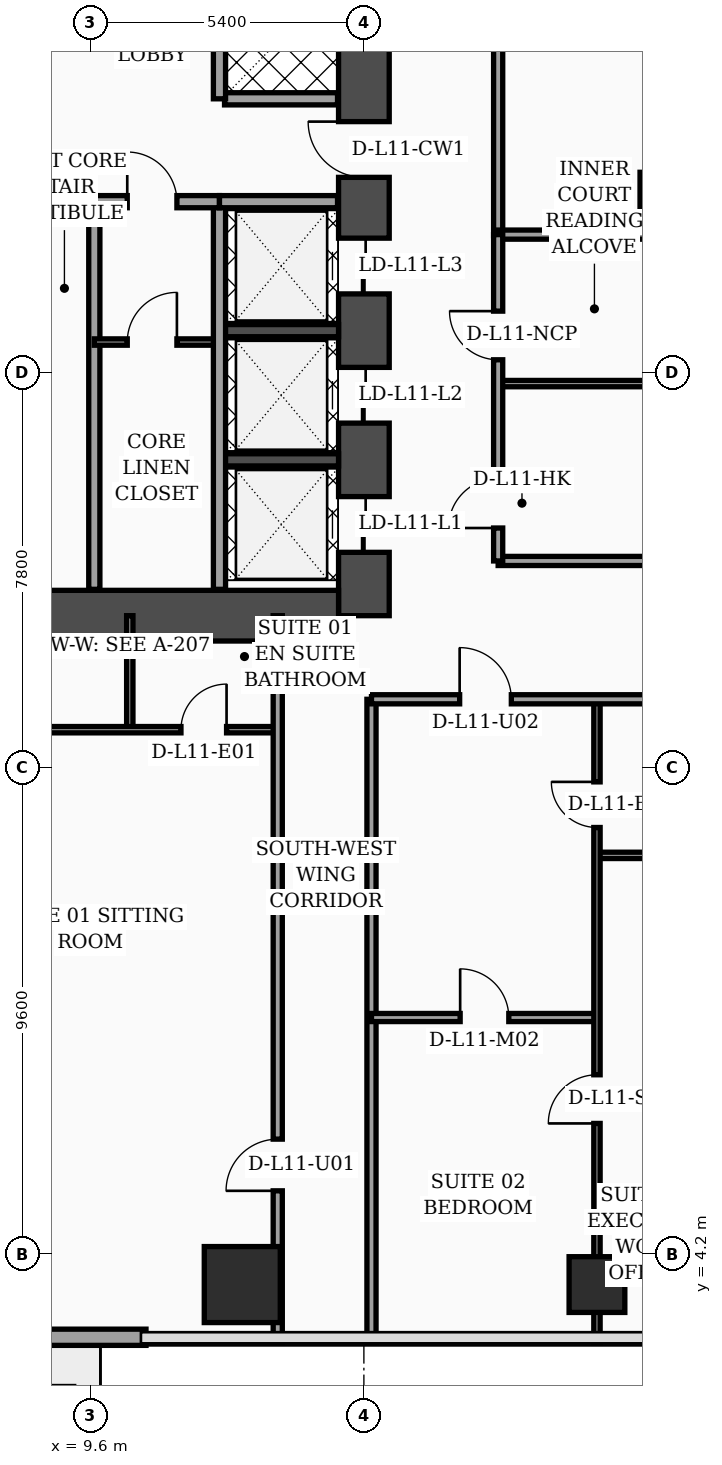
"""IFC4 building model, lengths in metres.
Left out: names, types, materials, properties, quantities, classifications, styles, units other than length and angle.
Written with IfcOpenShell. Run it as: python <this file> out.ifc"""

import sys

from ifc_helpers import new_model, si_unit, direction, frame, frame_2d, origin, origin_2d, place, context, subcontext, project, spatial, rectangle, hollow_rectangle, extrude, element, fill, save


model = new_model("IFC4")
c1 = context("Model", 3, precision=1e-05, world=origin(), true_north=direction((0.0, 1.0)))
c2 = subcontext(c1, "Body", "Model", "MODEL_VIEW")
j1 = project(units=[si_unit("LENGTHUNIT", "METRE"), si_unit("PLANEANGLEUNIT", "RADIAN")], contexts=[c1])
p1 = place(None, origin())
s1 = spatial("IfcSite", under=j1, at=p1, CompositionType="ELEMENT")
p2 = place(p1, origin())
s2 = spatial("IfcBuilding", under=s1, at=p2, CompositionType="ELEMENT")
p3 = place(p2, frame((0.0, 0.0, 50.8)))
s3 = spatial("IfcBuildingStorey", under=s2, at=p3, CompositionType="ELEMENT", Elevation=50.8)
p4 = place(p3, frame((15.0, 16.8, 0.0), z_axis=(0.0, 0.0, 1.0), x_axis=(0.0, 1.0, 0.0)))
e1 = element("IfcWall", 1, at=p4, inside=s3, PredefinedType="SHEAR", context=c2, shape_type="SweptSolid", body=[
    extrude(rectangle(XDim=21.6, YDim=1.0, at=frame_2d((10.8, 0.0))), origin(), (0.0, 0.0, 1.0), 3.56),
])
p5 = place(p4, frame((8.65, 0.0, 0.0)))
e2 = element("IfcOpeningElement", 2, at=p5, cuts=e1, PredefinedType="OPENING", context=c2, shape_type="SweptSolid", body=[
    extrude(rectangle(XDim=1.1, YDim=2.2, at=frame_2d((0.55, 1.1))), frame((0.0, 0.51, 0.0), z_axis=(0.0, -1.0, 0.0), x_axis=(1.0, 0.0, 0.0)), (0.0, 0.0, 1.0), 1.02),
])
p6 = place(p4, frame((1.25, 0.0, 0.0)))
e3 = element("IfcOpeningElement", 3, at=p6, cuts=e1, PredefinedType="OPENING", context=c2, shape_type="SweptSolid", body=[
    extrude(rectangle(XDim=1.1, YDim=2.2, at=frame_2d((0.55, 1.1))), frame((0.0, 0.51, 0.0), z_axis=(0.0, -1.0, 0.0), x_axis=(1.0, 0.0, 0.0)), (0.0, 0.0, 1.0), 1.02),
])
p7 = place(p4, frame((3.8, 0.0, 0.0)))
e4 = element("IfcOpeningElement", 4, at=p7, cuts=e1, PredefinedType="OPENING", context=c2, shape_type="SweptSolid", body=[
    extrude(rectangle(XDim=1.1, YDim=2.2, at=frame_2d((0.55, 1.1))), frame((0.0, 0.51, 0.0), z_axis=(0.0, -1.0, 0.0), x_axis=(1.0, 0.0, 0.0)), (0.0, 0.0, 1.0), 1.02),
])
p8 = place(p4, frame((6.35, 0.0, 0.0)))
e5 = element("IfcOpeningElement", 5, at=p8, cuts=e1, PredefinedType="OPENING", context=c2, shape_type="SweptSolid", body=[
    extrude(rectangle(XDim=1.1, YDim=2.2, at=frame_2d((0.55, 1.1))), frame((0.0, 0.51, 0.0), z_axis=(0.0, -1.0, 0.0), x_axis=(1.0, 0.0, 0.0)), (0.0, 0.0, 1.0), 1.02),
])
p9 = place(p3, frame((4.7, 16.8, 0.0), z_axis=(0.0, 0.0, 1.0), x_axis=(1.0, 0.0, 0.0)))
e6 = element("IfcWall", 6, at=p9, inside=s3, PredefinedType="SHEAR", context=c2, shape_type="SweptSolid", body=[
    extrude(rectangle(XDim=9.8, YDim=1.0, at=frame_2d((4.9, 0.0))), origin(), (0.0, 0.0, 1.0), 3.56),
])
for number, where, z_axis, x_axis in (
    (7, (12.18, 19.875, 0.0), (0.0, 0.0, 1.0), (1.0, 0.0, 0.0)),
    (8, (12.18, 22.425, 0.0), (0.0, 0.0, 1.0), (1.0, 0.0, 0.0)),
):
    element("IfcWall", number, at=place(p3, frame(where, z_axis=z_axis, x_axis=x_axis)), inside=s3, PredefinedType="SOLIDWALL", context=c2, shape_type="SweptSolid", body=[
        extrude(rectangle(XDim=2.32, YDim=0.24, at=frame_2d((1.16, 0.0))), origin(), (0.0, 0.0, 1.0), 3.56),
    ])
p10 = place(p3, frame((12.6, 3.6, 0.0), z_axis=(0.0, 0.0, 1.0), x_axis=(1.0, 0.0, 0.0)))
e9 = element("IfcColumn", 9, at=p10, inside=s3, PredefinedType="COLUMN", context=c2, shape_type="SweptSolid", body=[
    extrude(rectangle(XDim=1.5, YDim=1.5, at=origin_2d()), origin(), (0.0, 0.0, 1.0), 3.56),
])
for number, where, z_axis, x_axis in (
    (10, (21.0, 25.0, 0.0), (0.0, 0.0, 1.0), (1.0, 0.0, 0.0)),
    (11, (19.6, 3.6, 0.0), (0.0, 0.0, 1.0), (1.0, 0.0, 0.0)),
):
    element("IfcColumn", number, at=place(p3, frame(where, z_axis=z_axis, x_axis=x_axis)), inside=s3, PredefinedType="COLUMN", context=c2, shape_type="SweptSolid", body=[
        extrude(hollow_rectangle(XDim=1.1, YDim=1.1, WallThickness=0.045, at=origin_2d()), origin(), (0.0, 0.0, 1.0), 3.56),
    ])
p11 = place(p3, frame((3.1, 2.56, 0.0), z_axis=(0.0, 0.0, 1.0), x_axis=(1.0, 0.0, 0.0)))
e12 = element("IfcWall", 12, at=p11, inside=s3, PredefinedType="SOLIDWALL", context=c2, shape_type="SweptSolid", body=[
    extrude(rectangle(XDim=7.6, YDim=0.32, at=frame_2d((3.8, 0.0))), origin(), (0.0, 0.0, 1.0), 3.56),
])
p12 = place(p11, frame((0.45, 0.0, 0.75)))
e13 = element("IfcOpeningElement", 13, at=p12, cuts=e12, PredefinedType="OPENING", context=c2, shape_type="SweptSolid", body=[
    extrude(rectangle(XDim=1.0, YDim=1.6, at=frame_2d((0.5, 0.8))), frame((0.0, 0.17, 0.0), z_axis=(0.0, -1.0, 0.0), x_axis=(1.0, 0.0, 0.0)), (0.0, 0.0, 1.0), 0.34),
])
p13 = place(p11, frame((3.8, 0.0, 0.0)))
e14 = element("IfcOpeningElement", 14, at=p13, cuts=e12, PredefinedType="OPENING", context=c2, shape_type="SweptSolid", body=[
    extrude(rectangle(XDim=1.4, YDim=2.25, at=frame_2d((0.7, 1.125))), frame((0.0, 0.17, 0.0), z_axis=(0.0, -1.0, 0.0), x_axis=(1.0, 0.0, 0.0)), (0.0, 0.0, 1.0), 0.34),
])
p14 = place(p3, frame((9.68, 17.32, 0.0), z_axis=(0.0, 0.0, 1.0), x_axis=(0.0, 1.0, 0.0)))
e15 = element("IfcWall", 15, at=p14, inside=s3, PredefinedType="SOLIDWALL", context=c2, shape_type="SweptSolid", body=[
    extrude(rectangle(XDim=7.68, YDim=0.22, at=frame_2d((3.84, 0.0))), origin(), (0.0, 0.0, 1.0), 3.56),
])
p15 = place(p3, frame((9.68, 22.2, 0.0), z_axis=(0.0, 0.0, 1.0), x_axis=(1.0, 0.0, 0.0)))
e16 = element("IfcWall", 16, at=p15, inside=s3, PredefinedType="PARTITIONING", context=c2, shape_type="SweptSolid", body=[
    extrude(rectangle(XDim=2.47, YDim=0.125, at=frame_2d((1.235, 0.0))), origin(), (0.0, 0.0, 1.0), 3.56),
])
p16 = place(p15, frame((0.65, 0.0, 0.0)))
e17 = element("IfcOpeningElement", 17, at=p16, cuts=e16, PredefinedType="OPENING", context=c2, shape_type="SweptSolid", body=[
    extrude(rectangle(XDim=0.98, YDim=2.15, at=frame_2d((0.49, 1.075))), frame((0.0, 0.073, 0.0), z_axis=(0.0, -1.0, 0.0), x_axis=(1.0, 0.0, 0.0)), (0.0, 0.0, 1.0), 0.145),
])
p17 = place(p3, frame((12.15, 17.32, 0.0), z_axis=(0.0, 0.0, 1.0), x_axis=(0.0, 1.0, 0.0)))
e18 = element("IfcWall", 18, at=p17, inside=s3, PredefinedType="SOLIDWALL", context=c2, shape_type="SweptSolid", body=[
    extrude(rectangle(XDim=7.65, YDim=0.24, at=frame_2d((3.825, 0.0))), origin(), (0.0, 0.0, 1.0), 3.56),
])
p18 = place(p3, frame((9.68, 24.97, 0.0), z_axis=(0.0, 0.0, 1.0), x_axis=(1.0, 0.0, 0.0)))
e19 = element("IfcWall", 19, at=p18, inside=s3, PredefinedType="SOLIDWALL", context=c2, shape_type="SweptSolid", body=[
    extrude(rectangle(XDim=2.47, YDim=0.24, at=frame_2d((1.235, 0.0))), origin(), (0.0, 0.0, 1.0), 3.56),
])
p19 = place(p18, frame((0.65, 0.0, 0.0)))
e20 = element("IfcOpeningElement", 20, at=p19, cuts=e19, PredefinedType="OPENING", context=c2, shape_type="SweptSolid", body=[
    extrude(rectangle(XDim=0.98, YDim=2.15, at=frame_2d((0.49, 1.075))), frame((0.0, 0.13, 0.0), z_axis=(0.0, -1.0, 0.0), x_axis=(1.0, 0.0, 0.0)), (0.0, 0.0, 1.0), 0.26),
])
p20 = place(p3, frame((12.15, 24.97, 0.0), z_axis=(0.0, 0.0, 1.0), x_axis=(1.0, 0.0, 0.0)))
e21 = element("IfcWall", 21, at=p20, inside=s3, PredefinedType="SOLIDWALL", context=c2, shape_type="SweptSolid", body=[
    extrude(rectangle(XDim=2.33, YDim=0.24, at=frame_2d((1.165, 0.0))), origin(), (0.0, 0.0, 1.0), 2.84),
])
p21 = place(p3, frame((12.25, 27.0, 0.0), z_axis=(0.0, 0.0, 1.0), x_axis=(1.0, 0.0, 0.0)))
e22 = element("IfcWall", 22, at=p21, inside=s3, PredefinedType="SOLIDWALL", context=c2, shape_type="SweptSolid", body=[
    extrude(rectangle(XDim=2.23, YDim=0.24, at=frame_2d((1.115, 0.0))), origin(), (0.0, 0.0, 1.0), 3.56),
])
p22 = place(p3, frame((12.15, 27.0, 0.0), z_axis=(0.0, 0.0, 1.0), x_axis=(0.0, 1.0, 0.0)))
e23 = element("IfcWall", 23, at=p22, inside=s3, PredefinedType="SOLIDWALL", context=c2, shape_type="SweptSolid", body=[
    extrude(rectangle(XDim=7.75, YDim=0.24, at=frame_2d((3.875, 0.0))), origin(), (0.0, 0.0, 1.0), 3.56),
])
p23 = place(p3, frame((10.38, 14.55, 0.0), z_axis=(0.0, 0.0, 1.0), x_axis=(0.0, 1.0, 0.0)))
e24 = element("IfcWall", 24, at=p23, inside=s3, PredefinedType="PARTITIONING", context=c2, shape_type="SweptSolid", body=[
    extrude(rectangle(XDim=2.25, YDim=0.125, at=frame_2d((1.125, 0.0))), origin(), (0.0, 0.0, 1.0), 3.56),
])
p24 = place(p3, frame((3.2, 14.55, 0.0), z_axis=(0.0, 0.0, 1.0), x_axis=(1.0, 0.0, 0.0)))
e25 = element("IfcWall", 25, at=p24, inside=s3, PredefinedType="PARTITIONING", context=c2, shape_type="SweptSolid", body=[
    extrude(rectangle(XDim=10.1, YDim=0.125, at=frame_2d((5.05, 0.0))), origin(), (0.0, 0.0, 1.0), 2.84),
])
p25 = place(p24, frame((3.29, 0.0, 0.0)))
e26 = element("IfcOpeningElement", 26, at=p25, cuts=e25, PredefinedType="OPENING", context=c2, shape_type="SweptSolid", body=[
    extrude(rectangle(XDim=0.96, YDim=2.2, at=frame_2d((0.48, 1.1))), frame((0.0, 0.073, 0.0), z_axis=(0.0, -1.0, 0.0), x_axis=(1.0, 0.0, 0.0)), (0.0, 0.0, 1.0), 0.145),
])
p26 = place(p24, frame((8.19, 0.0, 0.0)))
e27 = element("IfcOpeningElement", 27, at=p26, cuts=e25, PredefinedType="OPENING", context=c2, shape_type="SweptSolid", body=[
    extrude(rectangle(XDim=0.9, YDim=2.15, at=frame_2d((0.45, 1.075))), frame((0.0, 0.073, 0.0), z_axis=(0.0, -1.0, 0.0), x_axis=(1.0, 0.0, 0.0)), (0.0, 0.0, 1.0), 0.145),
])
p27 = place(p3, frame((13.3, 2.44, 0.0), z_axis=(0.0, 0.0, 1.0), x_axis=(0.0, 1.0, 0.0)))
e28 = element("IfcWall", 28, at=p27, inside=s3, PredefinedType="PARTITIONING", context=c2, shape_type="SweptSolid", body=[
    extrude(rectangle(XDim=14.36, YDim=0.18, at=frame_2d((7.18, 0.0))), origin(), (0.0, 0.0, 1.0), 3.04),
])
p28 = place(p27, frame((3.01, 0.0, 0.0)))
e29 = element("IfcOpeningElement", 29, at=p28, cuts=e28, PredefinedType="OPENING", context=c2, shape_type="SweptSolid", body=[
    extrude(rectangle(XDim=1.02, YDim=2.2, at=frame_2d((0.51, 1.1))), frame((0.0, 0.1, 0.0), z_axis=(0.0, -1.0, 0.0), x_axis=(1.0, 0.0, 0.0)), (0.0, 0.0, 1.0), 0.2),
])
p29 = place(p3, frame((15.15, 2.44, 0.0), z_axis=(0.0, 0.0, 1.0), x_axis=(0.0, 1.0, 0.0)))
e30 = element("IfcWall", 30, at=p29, inside=s3, PredefinedType="PARTITIONING", context=c2, shape_type="SweptSolid", body=[
    extrude(rectangle(XDim=12.71, YDim=0.18, at=frame_2d((6.355, 0.0))), origin(), (0.0, 0.0, 1.0), 3.04),
])
p30 = place(p3, frame((19.6, 12.07, 0.0), z_axis=(0.0, 0.0, 1.0), x_axis=(1.0, 0.0, 0.0)))
e31 = element("IfcWall", 31, at=p30, inside=s3, PredefinedType="PARTITIONING", context=c2, shape_type="SweptSolid", body=[
    extrude(rectangle(XDim=2.0, YDim=0.125, at=frame_2d((1.0, 0.0))), origin(), (0.0, 0.0, 1.0), 3.56),
])
p31 = place(p3, frame((15.15, 8.87, 0.0), z_axis=(0.0, 0.0, 1.0), x_axis=(1.0, 0.0, 0.0)))
e32 = element("IfcWall", 32, at=p31, inside=s3, PredefinedType="PARTITIONING", context=c2, shape_type="SweptSolid", body=[
    extrude(rectangle(XDim=4.45, YDim=0.16, at=frame_2d((2.225, 0.0))), origin(), (0.0, 0.0, 1.0), 3.56),
])
p32 = place(p31, frame((1.75, 0.0, 0.0)))
e33 = element("IfcOpeningElement", 33, at=p32, cuts=e32, PredefinedType="OPENING", context=c2, shape_type="SweptSolid", body=[
    extrude(rectangle(XDim=0.96, YDim=2.2, at=frame_2d((0.48, 1.1))), frame((0.0, 0.09, 0.0), z_axis=(0.0, -1.0, 0.0), x_axis=(1.0, 0.0, 0.0)), (0.0, 0.0, 1.0), 0.18),
])
p33 = place(p3, frame((19.6, 2.44, 0.0), z_axis=(0.0, 0.0, 1.0), x_axis=(0.0, 1.0, 0.0)))
e34 = element("IfcWall", 34, at=p33, inside=s3, PredefinedType="PARTITIONING", context=c2, shape_type="SweptSolid", body=[
    extrude(rectangle(XDim=12.71, YDim=0.125, at=frame_2d((6.355, 0.0))), origin(), (0.0, 0.0, 1.0), 2.34),
])
p34 = place(p33, frame((4.34, 0.0, 0.0)))
e35 = element("IfcOpeningElement", 35, at=p34, cuts=e34, PredefinedType="OPENING", context=c2, shape_type="SweptSolid", body=[
    extrude(rectangle(XDim=0.96, YDim=2.2, at=frame_2d((0.48, 1.1))), frame((0.0, 0.073, 0.0), z_axis=(0.0, -1.0, 0.0), x_axis=(1.0, 0.0, 0.0)), (0.0, 0.0, 1.0), 0.145),
])
p35 = place(p33, frame((10.18, 0.0, 0.0)))
e36 = element("IfcOpeningElement", 36, at=p35, cuts=e34, PredefinedType="OPENING", context=c2, shape_type="SweptSolid", body=[
    extrude(rectangle(XDim=0.9, YDim=2.15, at=frame_2d((0.45, 1.075))), frame((0.0, 0.073, 0.0), z_axis=(0.0, -1.0, 0.0), x_axis=(1.0, 0.0, 0.0)), (0.0, 0.0, 1.0), 0.145),
])
p36 = place(p3, frame((15.15, 15.15, 0.0), z_axis=(0.0, 0.0, 1.0), x_axis=(1.0, 0.0, 0.0)))
e37 = element("IfcWall", 37, at=p36, inside=s3, PredefinedType="PARTITIONING", context=c2, shape_type="SweptSolid", body=[
    extrude(rectangle(XDim=6.45, YDim=0.18, at=frame_2d((3.225, 0.0))), origin(), (0.0, 0.0, 1.0), 2.34),
])
p37 = place(p36, frame((1.74, 0.0, 0.0)))
e38 = element("IfcOpeningElement", 38, at=p37, cuts=e37, PredefinedType="OPENING", context=c2, shape_type="SweptSolid", body=[
    extrude(rectangle(XDim=1.02, YDim=2.2, at=frame_2d((0.51, 1.1))), frame((0.0, 0.1, 0.0), z_axis=(0.0, -1.0, 0.0), x_axis=(1.0, 0.0, 0.0)), (0.0, 0.0, 1.0), 0.2),
])
p38 = place(p3, frame((17.65, 24.3, 0.0), z_axis=(0.0, 0.0, 1.0), x_axis=(0.0, 1.0, 0.0)))
e39 = element("IfcWall", 39, at=p38, inside=s3, PredefinedType="PARTITIONING", context=c2, shape_type="SweptSolid", body=[
    extrude(rectangle(XDim=16.4, YDim=0.18, at=frame_2d((8.2, 0.0))), origin(), (0.0, 0.0, 1.0), 2.84),
])
p39 = place(p3, frame((17.65, 17.88, 0.0), z_axis=(0.0, 0.0, 1.0), x_axis=(1.0, 0.0, 0.0)))
e40 = element("IfcWall", 40, at=p39, inside=s3, PredefinedType="PARTITIONING", context=c2, shape_type="SweptSolid", body=[
    extrude(rectangle(XDim=3.9, YDim=0.18, at=frame_2d((1.95, 0.0))), origin(), (0.0, 0.0, 1.0), 3.56),
])
p40 = place(p3, frame((17.65, 21.38, 0.0), z_axis=(0.0, 0.0, 1.0), x_axis=(1.0, 0.0, 0.0)))
e41 = element("IfcWall", 41, at=p40, inside=s3, PredefinedType="PARTITIONING", context=c2, shape_type="SweptSolid", body=[
    extrude(rectangle(XDim=3.9, YDim=0.125, at=frame_2d((1.95, 0.0))), origin(), (0.0, 0.0, 1.0), 3.56),
])
p41 = place(p3, frame((17.65, 24.32, 0.0), z_axis=(0.0, 0.0, 1.0), x_axis=(1.0, 0.0, 0.0)))
e42 = element("IfcWall", 42, at=p41, inside=s3, PredefinedType="PARTITIONING", context=c2, shape_type="SweptSolid", body=[
    extrude(rectangle(XDim=3.95, YDim=0.18, at=frame_2d((1.975, 0.0))), origin(), (0.0, 0.0, 1.0), 3.56),
])
p42 = place(p3, frame((17.65, 17.88, 0.0), z_axis=(0.0, 0.0, 1.0), x_axis=(0.0, 1.0, 0.0)))
e43 = element("IfcWall", 43, at=p42, inside=s3, PredefinedType="PARTITIONING", context=c2, shape_type="SweptSolid", body=[
    extrude(rectangle(XDim=6.44, YDim=0.18, at=frame_2d((3.22, 0.0))), origin(), (0.0, 0.0, 1.0), 3.56),
])
p43 = place(p42, frame((0.65, 0.0, 0.0)))
e44 = element("IfcOpeningElement", 44, at=p43, cuts=e43, PredefinedType="OPENING", context=c2, shape_type="SweptSolid", body=[
    extrude(rectangle(XDim=0.98, YDim=2.15, at=frame_2d((0.49, 1.075))), frame((0.0, 0.1, 0.0), z_axis=(0.0, -1.0, 0.0), x_axis=(1.0, 0.0, 0.0)), (0.0, 0.0, 1.0), 0.2),
])
p44 = place(p42, frame((3.97, 0.0, 0.0)))
e45 = element("IfcOpeningElement", 45, at=p44, cuts=e43, PredefinedType="OPENING", context=c2, shape_type="SweptSolid", body=[
    extrude(rectangle(XDim=0.96, YDim=2.2, at=frame_2d((0.48, 1.1))), frame((0.0, 0.1, 0.0), z_axis=(0.0, -1.0, 0.0), x_axis=(1.0, 0.0, 0.0)), (0.0, 0.0, 1.0), 0.2),
])
p45 = place(p16, origin())
e46 = element("IfcDoor", 46, at=p45, inside=s3, OperationType="SINGLE_SWING_RIGHT", PredefinedType="DOOR", context=c2, shape_type="SweptSolid", body=[
    extrude(rectangle(XDim=0.98, YDim=2.15, at=frame_2d((0.49, 1.075))), frame((0.0, 0.025, 0.0), z_axis=(0.0, -1.0, 0.0), x_axis=(1.0, 0.0, 0.0)), (0.0, 0.0, 1.0), 0.05),
])
fill(e17, e46)
p46 = place(p19, origin())
e47 = element("IfcDoor", 47, at=p46, inside=s3, OperationType="SINGLE_SWING_LEFT", PredefinedType="DOOR", context=c2, shape_type="SweptSolid", body=[
    extrude(rectangle(XDim=0.98, YDim=2.15, at=frame_2d((0.49, 1.075))), frame((0.0, 0.025, 0.0), z_axis=(0.0, -1.0, 0.0), x_axis=(1.0, 0.0, 0.0)), (0.0, 0.0, 1.0), 0.05),
])
fill(e20, e47)
p47 = place(p26, origin())
e48 = element("IfcDoor", 48, at=p47, inside=s3, OperationType="SINGLE_SWING_RIGHT", PredefinedType="DOOR", context=c2, shape_type="SweptSolid", body=[
    extrude(rectangle(XDim=0.9, YDim=2.15, at=frame_2d((0.45, 1.075))), frame((0.0, 0.025, 0.0), z_axis=(0.0, -1.0, 0.0), x_axis=(1.0, 0.0, 0.0)), (0.0, 0.0, 1.0), 0.05),
])
fill(e27, e48)
p48 = place(p28, origin())
e49 = element("IfcDoor", 49, at=p48, inside=s3, OperationType="SINGLE_SWING_LEFT", PredefinedType="DOOR", context=c2, shape_type="SweptSolid", body=[
    extrude(rectangle(XDim=1.02, YDim=2.2, at=frame_2d((0.51, 1.1))), frame((0.0, 0.025, 0.0), z_axis=(0.0, -1.0, 0.0), x_axis=(1.0, 0.0, 0.0)), (0.0, 0.0, 1.0), 0.05),
])
fill(e29, e49)
p49 = place(p32, origin())
e50 = element("IfcDoor", 50, at=p49, inside=s3, OperationType="SINGLE_SWING_LEFT", PredefinedType="DOOR", context=c2, shape_type="SweptSolid", body=[
    extrude(rectangle(XDim=0.96, YDim=2.2, at=frame_2d((0.48, 1.1))), frame((0.0, 0.025, 0.0), z_axis=(0.0, -1.0, 0.0), x_axis=(1.0, 0.0, 0.0)), (0.0, 0.0, 1.0), 0.05),
])
fill(e33, e50)
p50 = place(p34, origin())
e51 = element("IfcDoor", 51, at=p50, inside=s3, OperationType="SINGLE_SWING_LEFT", PredefinedType="DOOR", context=c2, shape_type="SweptSolid", body=[
    extrude(rectangle(XDim=0.96, YDim=2.2, at=frame_2d((0.48, 1.1))), frame((0.0, 0.025, 0.0), z_axis=(0.0, -1.0, 0.0), x_axis=(1.0, 0.0, 0.0)), (0.0, 0.0, 1.0), 0.05),
])
fill(e35, e51)
p51 = place(p35, origin())
e52 = element("IfcDoor", 52, at=p51, inside=s3, OperationType="SINGLE_SWING_RIGHT", PredefinedType="DOOR", context=c2, shape_type="SweptSolid", body=[
    extrude(rectangle(XDim=0.9, YDim=2.15, at=frame_2d((0.45, 1.075))), frame((0.0, 0.025, 0.0), z_axis=(0.0, -1.0, 0.0), x_axis=(1.0, 0.0, 0.0)), (0.0, 0.0, 1.0), 0.05),
])
fill(e36, e52)
p52 = place(p37, origin())
e53 = element("IfcDoor", 53, at=p52, inside=s3, OperationType="SINGLE_SWING_LEFT", PredefinedType="DOOR", context=c2, shape_type="SweptSolid", body=[
    extrude(rectangle(XDim=1.02, YDim=2.2, at=frame_2d((0.51, 1.1))), frame((0.0, 0.025, 0.0), z_axis=(0.0, -1.0, 0.0), x_axis=(1.0, 0.0, 0.0)), (0.0, 0.0, 1.0), 0.05),
])
fill(e38, e53)
p53 = place(p43, origin())
e54 = element("IfcDoor", 54, at=p53, inside=s3, OperationType="SINGLE_SWING_LEFT", PredefinedType="DOOR", context=c2, shape_type="SweptSolid", body=[
    extrude(rectangle(XDim=0.98, YDim=2.15, at=frame_2d((0.49, 1.075))), frame((0.0, 0.025, 0.0), z_axis=(0.0, -1.0, 0.0), x_axis=(1.0, 0.0, 0.0)), (0.0, 0.0, 1.0), 0.05),
])
fill(e44, e54)
p54 = place(p44, origin())
e55 = element("IfcDoor", 55, at=p54, inside=s3, OperationType="SINGLE_SWING_RIGHT", PredefinedType="DOOR", context=c2, shape_type="SweptSolid", body=[
    extrude(rectangle(XDim=0.96, YDim=2.2, at=frame_2d((0.48, 1.1))), frame((0.0, 0.025, 0.0), z_axis=(0.0, -1.0, 0.0), x_axis=(1.0, 0.0, 0.0)), (0.0, 0.0, 1.0), 0.05),
])
fill(e45, e55)
p55 = place(p5, origin())
e56 = element("IfcDoor", 56, at=p55, inside=s3, OperationType="SINGLE_SWING_RIGHT", PredefinedType="DOOR", context=c2, shape_type="SweptSolid", body=[
    extrude(rectangle(XDim=1.1, YDim=2.2, at=frame_2d((0.55, 1.1))), frame((0.0, 0.025, 0.0), z_axis=(0.0, -1.0, 0.0), x_axis=(1.0, 0.0, 0.0)), (0.0, 0.0, 1.0), 0.05),
])
fill(e2, e56)
p56 = place(p6, origin())
e57 = element("IfcDoor", 57, at=p56, inside=s3, OperationType="DOUBLE_DOOR_SLIDING", PredefinedType="DOOR", context=c2, shape_type="SweptSolid", body=[
    extrude(rectangle(XDim=1.1, YDim=2.2, at=frame_2d((0.55, 1.1))), frame((0.0, 0.025, 0.0), z_axis=(0.0, -1.0, 0.0), x_axis=(1.0, 0.0, 0.0)), (0.0, 0.0, 1.0), 0.05),
])
fill(e3, e57)
p57 = place(p7, origin())
e58 = element("IfcDoor", 58, at=p57, inside=s3, OperationType="DOUBLE_DOOR_SLIDING", PredefinedType="DOOR", context=c2, shape_type="SweptSolid", body=[
    extrude(rectangle(XDim=1.1, YDim=2.2, at=frame_2d((0.55, 1.1))), frame((0.0, 0.025, 0.0), z_axis=(0.0, -1.0, 0.0), x_axis=(1.0, 0.0, 0.0)), (0.0, 0.0, 1.0), 0.05),
])
fill(e4, e58)
p58 = place(p8, origin())
e59 = element("IfcDoor", 59, at=p58, inside=s3, OperationType="DOUBLE_DOOR_SLIDING", PredefinedType="DOOR", context=c2, shape_type="SweptSolid", body=[
    extrude(rectangle(XDim=1.1, YDim=2.2, at=frame_2d((0.55, 1.1))), frame((0.0, 0.025, 0.0), z_axis=(0.0, -1.0, 0.0), x_axis=(1.0, 0.0, 0.0)), (0.0, 0.0, 1.0), 0.05),
])
fill(e5, e59)
save(model, sys.argv[1])
